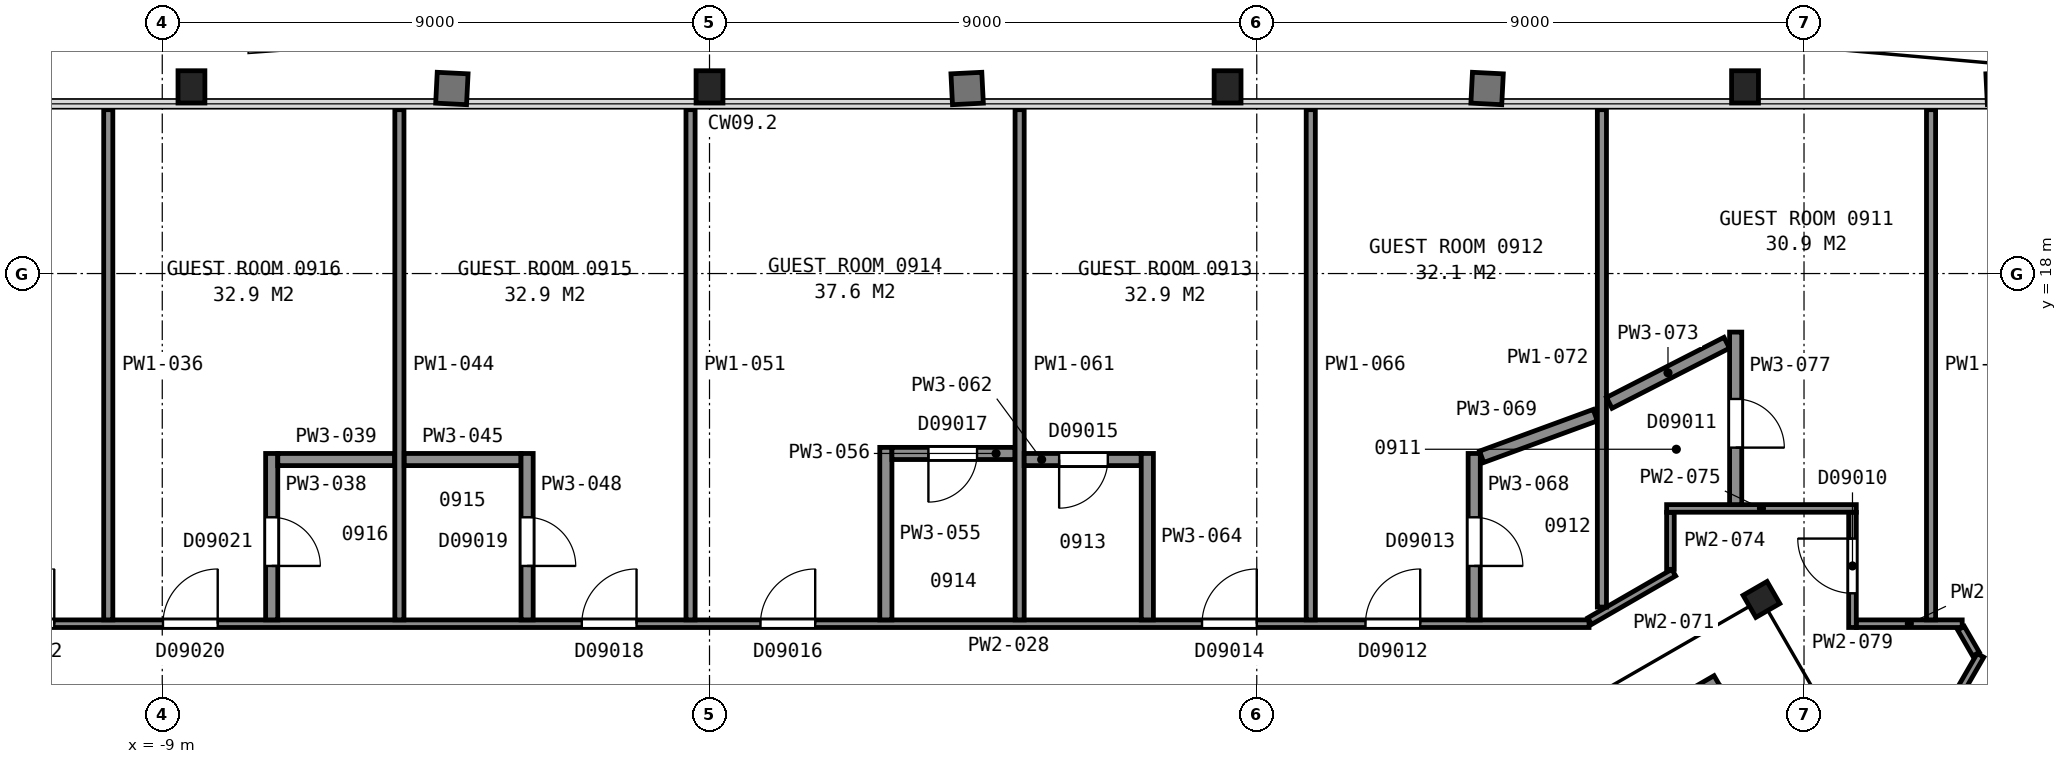
"""IFC4 building model, lengths in metres.
Left out: names, types, materials, properties, quantities, classifications, styles, units other than length and angle.
Written with IfcOpenShell. Run it as: python <this file> out.ifc"""

import sys

from ifc_helpers import new_model, si_unit, direction, frame, frame_2d, origin, origin_2d, place, context, subcontext, project, spatial, rectangle, i_section, extrude, element, fill, save


model = new_model("IFC4")
c1 = context("Model", 3, precision=1e-05, world=origin(), true_north=direction((0.0, 1.0)))
c2 = subcontext(c1, "Body", "Model", "MODEL_VIEW")
j1 = project(units=[si_unit("LENGTHUNIT", "METRE"), si_unit("PLANEANGLEUNIT", "RADIAN")], contexts=[c1])
p1 = place(None, origin())
s1 = spatial("IfcSite", under=j1, at=p1, CompositionType="ELEMENT")
p2 = place(p1, origin())
s2 = spatial("IfcBuilding", under=s1, at=p2, CompositionType="ELEMENT")
p3 = place(p2, frame((0.0, 0.0, 47.6)))
s3 = spatial("IfcBuildingStorey", under=s2, at=p3, CompositionType="ELEMENT", Elevation=47.6)
for number, where, z_axis, x_axis in (
    (1, (17.03, 21.07, 0.025), (0.0, 0.0, 1.0), (1.0, 0.0, 0.0)),
    (2, (8.52, 21.07, 0.025), (0.0, 0.0, 1.0), (1.0, 0.0, 0.0)),
    (3, (0.0, 21.07, 0.025), (0.0, 0.0, 1.0), (1.0, 0.0, 0.0)),
    (4, (-8.52, 21.07, 0.025), (0.0, 0.0, 1.0), (1.0, 0.0, 0.0)),
):
    element("IfcColumn", number, at=place(p3, frame(where, z_axis=z_axis, x_axis=x_axis)), inside=s3, PredefinedType="COLUMN", context=c2, shape_type="SweptSolid", body=[
        extrude(i_section(OverallWidth=0.442, OverallDepth=0.531, WebThickness=0.066, FlangeThickness=0.106, FilletRadius=0.015, at=origin_2d()), origin(), (0.0, 0.0, 1.0), 3.575),
    ])
p4 = place(p3, frame((17.3, 12.64, 0.0), z_axis=(0.0, 0.0, 1.0), x_axis=(0.5, -0.866025403784, 0.0)))
e5 = element("IfcColumn", 5, at=p4, inside=s3, PredefinedType="COLUMN", context=c2, shape_type="SweptSolid", body=[
    extrude(i_section(OverallWidth=0.419, OverallDepth=0.455, WebThickness=0.042, FlangeThickness=0.068, FilletRadius=0.015, at=origin_2d()), origin(), (0.0, 0.0, 1.0), 3.6),
])
for number, where, z_axis, x_axis in (
    (6, (6.178, 5.299, 0.0), (0.0, 0.0, 1.0), (0.866, 0.5, 0.0)),
    (7, (-6.178, 5.299, 0.0), (0.0, 0.0, 1.0), (-0.866, 0.5, 0.0)),
):
    element("IfcWall", number, at=place(p3, frame(where, z_axis=z_axis, x_axis=x_axis)), inside=s3, PredefinedType="PARTITIONING", context=c2, shape_type="SweptSolid", body=[
        extrude(rectangle(XDim=12.0, YDim=0.2, at=frame_2d((6.0, 0.0))), origin(), (0.0, 0.0, 1.0), 3.35),
    ])
p5 = place(p3, frame((-14.465, 12.241, 0.0), z_axis=(0.0, 0.0, 1.0), x_axis=(1.0, 0.0, 0.0)))
e8 = element("IfcWall", 8, at=p5, inside=s3, PredefinedType="PARTITIONING", context=c2, shape_type="SweptSolid", body=[
    extrude(rectangle(XDim=28.929, YDim=0.125, at=frame_2d((14.465, 0.0))), origin(), (0.0, 0.0, 1.0), 2.613),
])
p6 = place(p5, frame((25.252, 0.0, 0.0)))
e9 = element("IfcOpeningElement", 9, at=p6, cuts=e8, PredefinedType="OPENING", context=c2, shape_type="SweptSolid", body=[
    extrude(rectangle(XDim=0.9, YDim=2.1, at=frame_2d((0.45, 1.05))), frame((0.0, 0.073, 0.0), z_axis=(0.0, -1.0, 0.0), x_axis=(1.0, 0.0, 0.0)), (0.0, 0.0, 1.0), 0.145),
])
p7 = place(p5, frame((22.564, 0.0, 0.0)))
e10 = element("IfcOpeningElement", 10, at=p7, cuts=e8, PredefinedType="OPENING", context=c2, shape_type="SweptSolid", body=[
    extrude(rectangle(XDim=0.9, YDim=2.1, at=frame_2d((0.45, 1.05))), frame((0.0, 0.073, 0.0), z_axis=(0.0, -1.0, 0.0), x_axis=(1.0, 0.0, 0.0)), (0.0, 0.0, 1.0), 0.145),
])
p8 = place(p5, frame((15.302, 0.0, 0.0)))
e11 = element("IfcOpeningElement", 11, at=p8, cuts=e8, PredefinedType="OPENING", context=c2, shape_type="SweptSolid", body=[
    extrude(rectangle(XDim=0.9, YDim=2.1, at=frame_2d((0.45, 1.05))), frame((0.0, 0.073, 0.0), z_axis=(0.0, -1.0, 0.0), x_axis=(1.0, 0.0, 0.0)), (0.0, 0.0, 1.0), 0.145),
])
p9 = place(p5, frame((12.365, 0.0, 0.0)))
e12 = element("IfcOpeningElement", 12, at=p9, cuts=e8, PredefinedType="OPENING", context=c2, shape_type="SweptSolid", body=[
    extrude(rectangle(XDim=0.9, YDim=2.1, at=frame_2d((0.45, 1.05))), frame((0.0, 0.073, 0.0), z_axis=(0.0, -1.0, 0.0), x_axis=(1.0, 0.0, 0.0)), (0.0, 0.0, 1.0), 0.145),
])
p10 = place(p5, frame((5.477, 0.0, 0.0)))
e13 = element("IfcOpeningElement", 13, at=p10, cuts=e8, PredefinedType="OPENING", context=c2, shape_type="SweptSolid", body=[
    extrude(rectangle(XDim=0.9, YDim=2.1, at=frame_2d((0.45, 1.05))), frame((0.0, 0.073, 0.0), z_axis=(0.0, -1.0, 0.0), x_axis=(1.0, 0.0, 0.0)), (0.0, 0.0, 1.0), 0.145),
])
p11 = place(p5, frame((2.789, 0.0, 0.0)))
e14 = element("IfcOpeningElement", 14, at=p11, cuts=e8, PredefinedType="OPENING", context=c2, shape_type="SweptSolid", body=[
    extrude(rectangle(XDim=0.9, YDim=2.1, at=frame_2d((0.45, 1.05))), frame((0.0, 0.073, 0.0), z_axis=(0.0, -1.0, 0.0), x_axis=(1.0, 0.0, 0.0)), (0.0, 0.0, 1.0), 0.145),
])
p12 = place(p3, frame((-9.888, 12.303, 0.0), z_axis=(0.0, 0.0, 1.0), x_axis=(0.0, 1.0, 0.0)))
e15 = element("IfcWall", 15, at=p12, inside=s3, PredefinedType="PARTITIONING", context=c2, shape_type="SweptSolid", body=[
    extrude(rectangle(XDim=8.392, YDim=0.15, at=frame_2d((4.196, 0.0))), origin(), (0.0, 0.0, 1.0), 2.613),
])
p13 = place(p3, frame((-7.2, 15.041, 0.0), z_axis=(0.0, 0.0, 1.0), x_axis=(0.0, -1.0, 0.0)))
e16 = element("IfcWall", 16, at=p13, inside=s3, PredefinedType="PARTITIONING", context=c2, shape_type="SweptSolid", body=[
    extrude(rectangle(XDim=2.738, YDim=0.2, at=frame_2d((1.369, 0.0))), origin(), (0.0, 0.0, 1.0), 2.613),
])
p14 = place(p13, frame((1.05, 0.0, 0.0)))
e17 = element("IfcOpeningElement", 17, at=p14, cuts=e16, PredefinedType="OPENING", context=c2, shape_type="SweptSolid", body=[
    extrude(rectangle(XDim=0.8, YDim=2.1, at=frame_2d((0.4, 1.05))), frame((0.0, 0.11, 0.0), z_axis=(0.0, -1.0, 0.0), x_axis=(1.0, 0.0, 0.0)), (0.0, 0.0, 1.0), 0.22),
])
p15 = place(p3, frame((-7.1, 14.941, 0.0), z_axis=(0.0, 0.0, 1.0), x_axis=(1.0, 0.0, 0.0)))
e18 = element("IfcWall", 18, at=p15, inside=s3, PredefinedType="PARTITIONING", context=c2, shape_type="SweptSolid", body=[
    extrude(rectangle(XDim=1.92, YDim=0.2, at=frame_2d((0.96, 0.0))), origin(), (0.0, 0.0, 1.0), 2.613),
])
p16 = place(p3, frame((-5.1, 12.303, 0.0), z_axis=(0.0, 0.0, 1.0), x_axis=(0.0, 1.0, 0.0)))
e19 = element("IfcWall", 19, at=p16, inside=s3, PredefinedType="PARTITIONING", context=c2, shape_type="SweptSolid", body=[
    extrude(rectangle(XDim=8.392, YDim=0.15, at=frame_2d((4.196, 0.0))), origin(), (0.0, 0.0, 1.0), 2.613),
])
p17 = place(p3, frame((-5.02, 14.941, 0.0), z_axis=(0.0, 0.0, 1.0), x_axis=(1.0, 0.0, 0.0)))
e20 = element("IfcWall", 20, at=p17, inside=s3, PredefinedType="PARTITIONING", context=c2, shape_type="SweptSolid", body=[
    extrude(rectangle(XDim=1.92, YDim=0.2, at=frame_2d((0.96, 0.0))), origin(), (0.0, 0.0, 1.0), 2.613),
])
p18 = place(p3, frame((-3.0, 12.303, 0.0), z_axis=(0.0, 0.0, 1.0), x_axis=(0.0, 1.0, 0.0)))
e21 = element("IfcWall", 21, at=p18, inside=s3, PredefinedType="PARTITIONING", context=c2, shape_type="SweptSolid", body=[
    extrude(rectangle(XDim=2.738, YDim=0.2, at=frame_2d((1.369, 0.0))), origin(), (0.0, 0.0, 1.0), 2.613),
])
p19 = place(p18, frame((0.887, 0.0, 0.0)))
e22 = element("IfcOpeningElement", 22, at=p19, cuts=e21, PredefinedType="OPENING", context=c2, shape_type="SweptSolid", body=[
    extrude(rectangle(XDim=0.8, YDim=2.1, at=frame_2d((0.4, 1.05))), frame((0.0, 0.11, 0.0), z_axis=(0.0, -1.0, 0.0), x_axis=(1.0, 0.0, 0.0)), (0.0, 0.0, 1.0), 0.22),
])
p20 = place(p3, frame((-0.312, 12.303, 0.0), z_axis=(0.0, 0.0, 1.0), x_axis=(0.0, 1.0, 0.0)))
e23 = element("IfcWall", 23, at=p20, inside=s3, PredefinedType="PARTITIONING", context=c2, shape_type="SweptSolid", body=[
    extrude(rectangle(XDim=8.392, YDim=0.15, at=frame_2d((4.196, 0.0))), origin(), (0.0, 0.0, 1.0), 2.613),
])
p21 = place(p3, frame((2.9, 12.303, 0.0), z_axis=(0.0, 0.0, 1.0), x_axis=(0.0, 1.0, 0.0)))
e24 = element("IfcWall", 24, at=p21, inside=s3, PredefinedType="PARTITIONING", context=c2, shape_type="SweptSolid", body=[
    extrude(rectangle(XDim=2.838, YDim=0.2, at=frame_2d((1.419, 0.0))), origin(), (0.0, 0.0, 1.0), 2.613),
])
p22 = place(p3, frame((5.025, 15.041, 0.0), z_axis=(0.0, 0.0, 1.0), x_axis=(-1.0, 0.0, 0.0)))
e25 = element("IfcWall", 25, at=p22, inside=s3, PredefinedType="PARTITIONING", context=c2, shape_type="SweptSolid", body=[
    extrude(rectangle(XDim=2.025, YDim=0.2, at=frame_2d((1.012, 0.0))), origin(), (0.0, 0.0, 1.0), 2.613),
])
p23 = place(p22, frame((0.625, 0.0, 0.0)))
e26 = element("IfcOpeningElement", 26, at=p23, cuts=e25, PredefinedType="OPENING", context=c2, shape_type="SweptSolid", body=[
    extrude(rectangle(XDim=0.8, YDim=2.1, at=frame_2d((0.4, 1.05))), frame((0.0, 0.11, 0.0), z_axis=(0.0, -1.0, 0.0), x_axis=(1.0, 0.0, 0.0)), (0.0, 0.0, 1.0), 0.22),
])
p24 = place(p3, frame((5.1, 12.303, 0.0), z_axis=(0.0, 0.0, 1.0), x_axis=(0.0, 1.0, 0.0)))
e27 = element("IfcWall", 27, at=p24, inside=s3, PredefinedType="PARTITIONING", context=c2, shape_type="SweptSolid", body=[
    extrude(rectangle(XDim=8.392, YDim=0.15, at=frame_2d((4.196, 0.0))), origin(), (0.0, 0.0, 1.0), 2.613),
])
p25 = place(p3, frame((7.1, 14.941, 0.0), z_axis=(0.0, 0.0, 1.0), x_axis=(-1.0, 0.0, 0.0)))
e28 = element("IfcWall", 28, at=p25, inside=s3, PredefinedType="PARTITIONING", context=c2, shape_type="SweptSolid", body=[
    extrude(rectangle(XDim=1.925, YDim=0.2, at=frame_2d((0.962, 0.0))), origin(), (0.0, 0.0, 1.0), 2.613),
])
p26 = place(p25, frame((0.55, 0.0, 0.0)))
e29 = element("IfcOpeningElement", 29, at=p26, cuts=e28, PredefinedType="OPENING", context=c2, shape_type="SweptSolid", body=[
    extrude(rectangle(XDim=0.8, YDim=2.1, at=frame_2d((0.4, 1.05))), frame((0.0, 0.11, 0.0), z_axis=(0.0, -1.0, 0.0), x_axis=(1.0, 0.0, 0.0)), (0.0, 0.0, 1.0), 0.22),
])
p27 = place(p3, frame((7.2, 12.303, 0.0), z_axis=(0.0, 0.0, 1.0), x_axis=(0.0, 1.0, 0.0)))
e30 = element("IfcWall", 30, at=p27, inside=s3, PredefinedType="PARTITIONING", context=c2, shape_type="SweptSolid", body=[
    extrude(rectangle(XDim=2.738, YDim=0.2, at=frame_2d((1.369, 0.0))), origin(), (0.0, 0.0, 1.0), 2.613),
])
p28 = place(p3, frame((9.888, 12.303, 0.0), z_axis=(0.0, 0.0, 1.0), x_axis=(0.0, 1.0, 0.0)))
e31 = element("IfcWall", 31, at=p28, inside=s3, PredefinedType="PARTITIONING", context=c2, shape_type="SweptSolid", body=[
    extrude(rectangle(XDim=8.392, YDim=0.15, at=frame_2d((4.196, 0.0))), origin(), (0.0, 0.0, 1.0), 2.613),
])
p29 = place(p3, frame((12.576, 15.041, 0.0), z_axis=(0.0, 0.0, 1.0), x_axis=(0.0, -1.0, 0.0)))
e32 = element("IfcWall", 32, at=p29, inside=s3, PredefinedType="PARTITIONING", context=c2, shape_type="SweptSolid", body=[
    extrude(rectangle(XDim=2.738, YDim=0.2, at=frame_2d((1.369, 0.0))), origin(), (0.0, 0.0, 1.0), 2.613),
])
p30 = place(p29, frame((1.05, 0.0, 0.0)))
e33 = element("IfcOpeningElement", 33, at=p30, cuts=e32, PredefinedType="OPENING", context=c2, shape_type="SweptSolid", body=[
    extrude(rectangle(XDim=0.8, YDim=2.1, at=frame_2d((0.4, 1.05))), frame((0.0, 0.11, 0.0), z_axis=(0.0, -1.0, 0.0), x_axis=(1.0, 0.0, 0.0)), (0.0, 0.0, 1.0), 0.22),
])
p31 = place(p3, frame((12.698, 14.986, 0.0), z_axis=(0.0, 0.0, 1.0), x_axis=(0.938894816734, 0.344204188105, 0.0)))
e34 = element("IfcWall", 34, at=p31, inside=s3, PredefinedType="PARTITIONING", context=c2, shape_type="SweptSolid", body=[
    extrude(rectangle(XDim=1.99, YDim=0.2, at=frame_2d((0.995, 0.0))), origin(), (0.0, 0.0, 1.0), 2.613),
])
p32 = place(p3, frame((14.476, 12.283, 0.0), z_axis=(0.0, 0.0, 1.0), x_axis=(0.865974057503, 0.500088923824, 0.0)))
e35 = element("IfcWall", 35, at=p32, inside=s3, PredefinedType="PARTITIONING", context=c2, shape_type="SweptSolid", body=[
    extrude(rectangle(XDim=1.595, YDim=0.125, at=frame_2d((0.798, 0.0))), origin(), (0.0, 0.0, 1.0), 2.613),
])
p33 = place(p3, frame((14.676, 12.514, 0.0), z_axis=(0.0, 0.0, 1.0), x_axis=(0.0, 1.0, 0.0)))
e36 = element("IfcWall", 36, at=p33, inside=s3, PredefinedType="PARTITIONING", context=c2, shape_type="SweptSolid", body=[
    extrude(rectangle(XDim=8.181, YDim=0.15, at=frame_2d((4.09, 0.0))), origin(), (0.0, 0.0, 1.0), 2.613),
])
p34 = place(p3, frame((14.797, 15.873, 0.0), z_axis=(0.0, 0.0, 1.0), x_axis=(0.890181338078, 0.455606392995, 0.0)))
e37 = element("IfcWall", 37, at=p34, inside=s3, PredefinedType="PARTITIONING", context=c2, shape_type="SweptSolid", body=[
    extrude(rectangle(XDim=2.171, YDim=0.2, at=frame_2d((1.085, 0.0))), origin(), (0.0, 0.0, 1.0), 2.613),
])
p35 = place(p3, frame((15.803, 13.135, 0.0), z_axis=(0.0, 0.0, 1.0), x_axis=(0.0, 1.0, 0.0)))
e38 = element("IfcWall", 38, at=p35, inside=s3, PredefinedType="PARTITIONING", context=c2, shape_type="SweptSolid", body=[
    extrude(rectangle(XDim=0.937, YDim=0.125, at=frame_2d((0.469, 0.0))), origin(), (0.0, 0.0, 1.0), 2.613),
])
p36 = place(p3, frame((15.74, 14.137, 0.0), z_axis=(0.0, 0.0, 1.0), x_axis=(1.0, 0.0, 0.0)))
e39 = element("IfcWall", 39, at=p36, inside=s3, PredefinedType="PARTITIONING", context=c2, shape_type="SweptSolid", body=[
    extrude(rectangle(XDim=3.119, YDim=0.125, at=frame_2d((1.56, 0.0))), origin(), (0.0, 0.0, 1.0), 2.613),
])
p37 = place(p3, frame((16.876, 14.199, 0.0), z_axis=(0.0, 0.0, 1.0), x_axis=(0.0, 1.0, 0.0)))
e40 = element("IfcWall", 40, at=p37, inside=s3, PredefinedType="PARTITIONING", context=c2, shape_type="SweptSolid", body=[
    extrude(rectangle(XDim=2.838, YDim=0.2, at=frame_2d((1.419, 0.0))), origin(), (0.0, 0.0, 1.0), 2.613),
])
p38 = place(p37, frame((0.938, 0.0, 0.0)))
e41 = element("IfcOpeningElement", 41, at=p38, cuts=e40, PredefinedType="OPENING", context=c2, shape_type="SweptSolid", body=[
    extrude(rectangle(XDim=0.8, YDim=2.1, at=frame_2d((0.4, 1.05))), frame((0.0, 0.11, 0.0), z_axis=(0.0, -1.0, 0.0), x_axis=(1.0, 0.0, 0.0)), (0.0, 0.0, 1.0), 0.22),
])
p39 = place(p3, frame((18.797, 14.072, 0.0), z_axis=(0.0, 0.0, 1.0), x_axis=(0.0, -1.0, 0.0)))
e42 = element("IfcWall", 42, at=p39, inside=s3, PredefinedType="PARTITIONING", context=c2, shape_type="SweptSolid", body=[
    extrude(rectangle(XDim=1.894, YDim=0.125, at=frame_2d((0.947, 0.0))), origin(), (0.0, 0.0, 1.0), 2.613),
])
p40 = place(p39, frame((0.431, 0.0, 0.0)))
e43 = element("IfcOpeningElement", 43, at=p40, cuts=e42, PredefinedType="OPENING", context=c2, shape_type="SweptSolid", body=[
    extrude(rectangle(XDim=0.9, YDim=2.1, at=frame_2d((0.45, 1.05))), frame((0.0, 0.073, 0.0), z_axis=(0.0, -1.0, 0.0), x_axis=(1.0, 0.0, 0.0)), (0.0, 0.0, 1.0), 0.145),
])
p41 = place(p3, frame((18.862, 12.241, 0.0), z_axis=(0.0, 0.0, 1.0), x_axis=(1.0, 0.0, 0.0)))
e44 = element("IfcWall", 44, at=p41, inside=s3, PredefinedType="PARTITIONING", context=c2, shape_type="SweptSolid", body=[
    extrude(rectangle(XDim=1.74, YDim=0.125, at=frame_2d((0.87, 0.0))), origin(), (0.0, 0.0, 1.0), 2.613),
])
p42 = place(p3, frame((19.968, 10.103, 0.0), z_axis=(0.0, 0.0, 1.0), x_axis=(0.500072997275, 0.865983254686, 0.0)))
e45 = element("IfcWall", 45, at=p42, inside=s3, PredefinedType="PARTITIONING", context=c2, shape_type="SweptSolid", body=[
    extrude(rectangle(XDim=1.869, YDim=0.125, at=frame_2d((0.935, 0.0))), origin(), (0.0, 0.0, 1.0), 2.613),
])
p43 = place(p3, frame((20.089, 12.303, 0.0), z_axis=(0.0, 0.0, 1.0), x_axis=(0.0, 1.0, 0.0)))
e46 = element("IfcWall", 46, at=p43, inside=s3, PredefinedType="PARTITIONING", context=c2, shape_type="SweptSolid", body=[
    extrude(rectangle(XDim=8.392, YDim=0.15, at=frame_2d((4.196, 0.0))), origin(), (0.0, 0.0, 1.0), 2.613),
])
p44 = place(p3, frame((20.582, 12.167, 0.0), z_axis=(0.0, 0.0, 1.0), x_axis=(0.500450775723, -0.86576499183, 0.0)))
e47 = element("IfcWall", 47, at=p44, inside=s3, PredefinedType="PARTITIONING", context=c2, shape_type="SweptSolid", body=[
    extrude(rectangle(XDim=0.493, YDim=0.125, at=frame_2d((0.247, 0.0))), origin(), (0.0, 0.0, 1.0), 2.613),
])
p45 = place(p6, origin())
e48 = element("IfcDoor", 48, at=p45, inside=s3, OperationType="SINGLE_SWING_RIGHT", PredefinedType="DOOR", context=c2, shape_type="SweptSolid", body=[
    extrude(rectangle(XDim=0.9, YDim=2.1, at=frame_2d((0.45, 1.05))), frame((0.0, 0.025, 0.0), z_axis=(0.0, -1.0, 0.0), x_axis=(1.0, 0.0, 0.0)), (0.0, 0.0, 1.0), 0.05),
])
fill(e9, e48)
p46 = place(p7, origin())
e49 = element("IfcDoor", 49, at=p46, inside=s3, OperationType="SINGLE_SWING_RIGHT", PredefinedType="DOOR", context=c2, shape_type="SweptSolid", body=[
    extrude(rectangle(XDim=0.9, YDim=2.1, at=frame_2d((0.45, 1.05))), frame((0.0, 0.025, 0.0), z_axis=(0.0, -1.0, 0.0), x_axis=(1.0, 0.0, 0.0)), (0.0, 0.0, 1.0), 0.05),
])
fill(e10, e49)
p47 = place(p8, origin())
e50 = element("IfcDoor", 50, at=p47, inside=s3, OperationType="SINGLE_SWING_RIGHT", PredefinedType="DOOR", context=c2, shape_type="SweptSolid", body=[
    extrude(rectangle(XDim=0.9, YDim=2.1, at=frame_2d((0.45, 1.05))), frame((0.0, 0.025, 0.0), z_axis=(0.0, -1.0, 0.0), x_axis=(1.0, 0.0, 0.0)), (0.0, 0.0, 1.0), 0.05),
])
fill(e11, e50)
p48 = place(p9, origin())
e51 = element("IfcDoor", 51, at=p48, inside=s3, OperationType="SINGLE_SWING_RIGHT", PredefinedType="DOOR", context=c2, shape_type="SweptSolid", body=[
    extrude(rectangle(XDim=0.9, YDim=2.1, at=frame_2d((0.45, 1.05))), frame((0.0, 0.025, 0.0), z_axis=(0.0, -1.0, 0.0), x_axis=(1.0, 0.0, 0.0)), (0.0, 0.0, 1.0), 0.05),
])
fill(e12, e51)
p49 = place(p10, origin())
e52 = element("IfcDoor", 52, at=p49, inside=s3, OperationType="SINGLE_SWING_RIGHT", PredefinedType="DOOR", context=c2, shape_type="SweptSolid", body=[
    extrude(rectangle(XDim=0.9, YDim=2.1, at=frame_2d((0.45, 1.05))), frame((0.0, 0.025, 0.0), z_axis=(0.0, -1.0, 0.0), x_axis=(1.0, 0.0, 0.0)), (0.0, 0.0, 1.0), 0.05),
])
fill(e13, e52)
p50 = place(p11, origin())
e53 = element("IfcDoor", 53, at=p50, inside=s3, OperationType="SINGLE_SWING_RIGHT", PredefinedType="DOOR", context=c2, shape_type="SweptSolid", body=[
    extrude(rectangle(XDim=0.9, YDim=2.1, at=frame_2d((0.45, 1.05))), frame((0.0, 0.025, 0.0), z_axis=(0.0, -1.0, 0.0), x_axis=(1.0, 0.0, 0.0)), (0.0, 0.0, 1.0), 0.05),
])
fill(e14, e53)
p51 = place(p14, origin())
e54 = element("IfcDoor", 54, at=p51, inside=s3, OperationType="SINGLE_SWING_RIGHT", PredefinedType="DOOR", context=c2, shape_type="SweptSolid", body=[
    extrude(rectangle(XDim=0.8, YDim=2.1, at=frame_2d((0.4, 1.05))), frame((0.0, 0.025, 0.0), z_axis=(0.0, -1.0, 0.0), x_axis=(1.0, 0.0, 0.0)), (0.0, 0.0, 1.0), 0.05),
])
fill(e17, e54)
p52 = place(p19, origin())
e55 = element("IfcDoor", 55, at=p52, inside=s3, OperationType="SINGLE_SWING_LEFT", PredefinedType="DOOR", context=c2, shape_type="SweptSolid", body=[
    extrude(rectangle(XDim=0.8, YDim=2.1, at=frame_2d((0.4, 1.05))), frame((0.0, 0.025, 0.0), z_axis=(0.0, -1.0, 0.0), x_axis=(1.0, 0.0, 0.0)), (0.0, 0.0, 1.0), 0.05),
])
fill(e22, e55)
p53 = place(p23, origin())
e56 = element("IfcDoor", 56, at=p53, inside=s3, OperationType="SINGLE_SWING_RIGHT", PredefinedType="DOOR", context=c2, shape_type="SweptSolid", body=[
    extrude(rectangle(XDim=0.8, YDim=2.1, at=frame_2d((0.4, 1.05))), frame((0.0, 0.025, 0.0), z_axis=(0.0, -1.0, 0.0), x_axis=(1.0, 0.0, 0.0)), (0.0, 0.0, 1.0), 0.05),
])
fill(e26, e56)
p54 = place(p26, origin())
e57 = element("IfcDoor", 57, at=p54, inside=s3, OperationType="SINGLE_SWING_RIGHT", PredefinedType="DOOR", context=c2, shape_type="SweptSolid", body=[
    extrude(rectangle(XDim=0.8, YDim=2.1, at=frame_2d((0.4, 1.05))), frame((0.0, 0.025, 0.0), z_axis=(0.0, -1.0, 0.0), x_axis=(1.0, 0.0, 0.0)), (0.0, 0.0, 1.0), 0.05),
])
fill(e29, e57)
p55 = place(p30, origin())
e58 = element("IfcDoor", 58, at=p55, inside=s3, OperationType="SINGLE_SWING_RIGHT", PredefinedType="DOOR", context=c2, shape_type="SweptSolid", body=[
    extrude(rectangle(XDim=0.8, YDim=2.1, at=frame_2d((0.4, 1.05))), frame((0.0, 0.025, 0.0), z_axis=(0.0, -1.0, 0.0), x_axis=(1.0, 0.0, 0.0)), (0.0, 0.0, 1.0), 0.05),
])
fill(e33, e58)
p56 = place(p38, origin())
e59 = element("IfcDoor", 59, at=p56, inside=s3, OperationType="SINGLE_SWING_LEFT", PredefinedType="DOOR", context=c2, shape_type="SweptSolid", body=[
    extrude(rectangle(XDim=0.8, YDim=2.1, at=frame_2d((0.4, 1.05))), frame((0.0, 0.025, 0.0), z_axis=(0.0, -1.0, 0.0), x_axis=(1.0, 0.0, 0.0)), (0.0, 0.0, 1.0), 0.05),
])
fill(e41, e59)
p57 = place(p40, origin())
e60 = element("IfcDoor", 60, at=p57, inside=s3, OperationType="SINGLE_SWING_LEFT", PredefinedType="DOOR", context=c2, shape_type="SweptSolid", body=[
    extrude(rectangle(XDim=0.9, YDim=2.1, at=frame_2d((0.45, 1.05))), frame((0.0, 0.025, 0.0), z_axis=(0.0, -1.0, 0.0), x_axis=(1.0, 0.0, 0.0)), (0.0, 0.0, 1.0), 0.05),
])
fill(e43, e60)
save(model, sys.argv[1])
